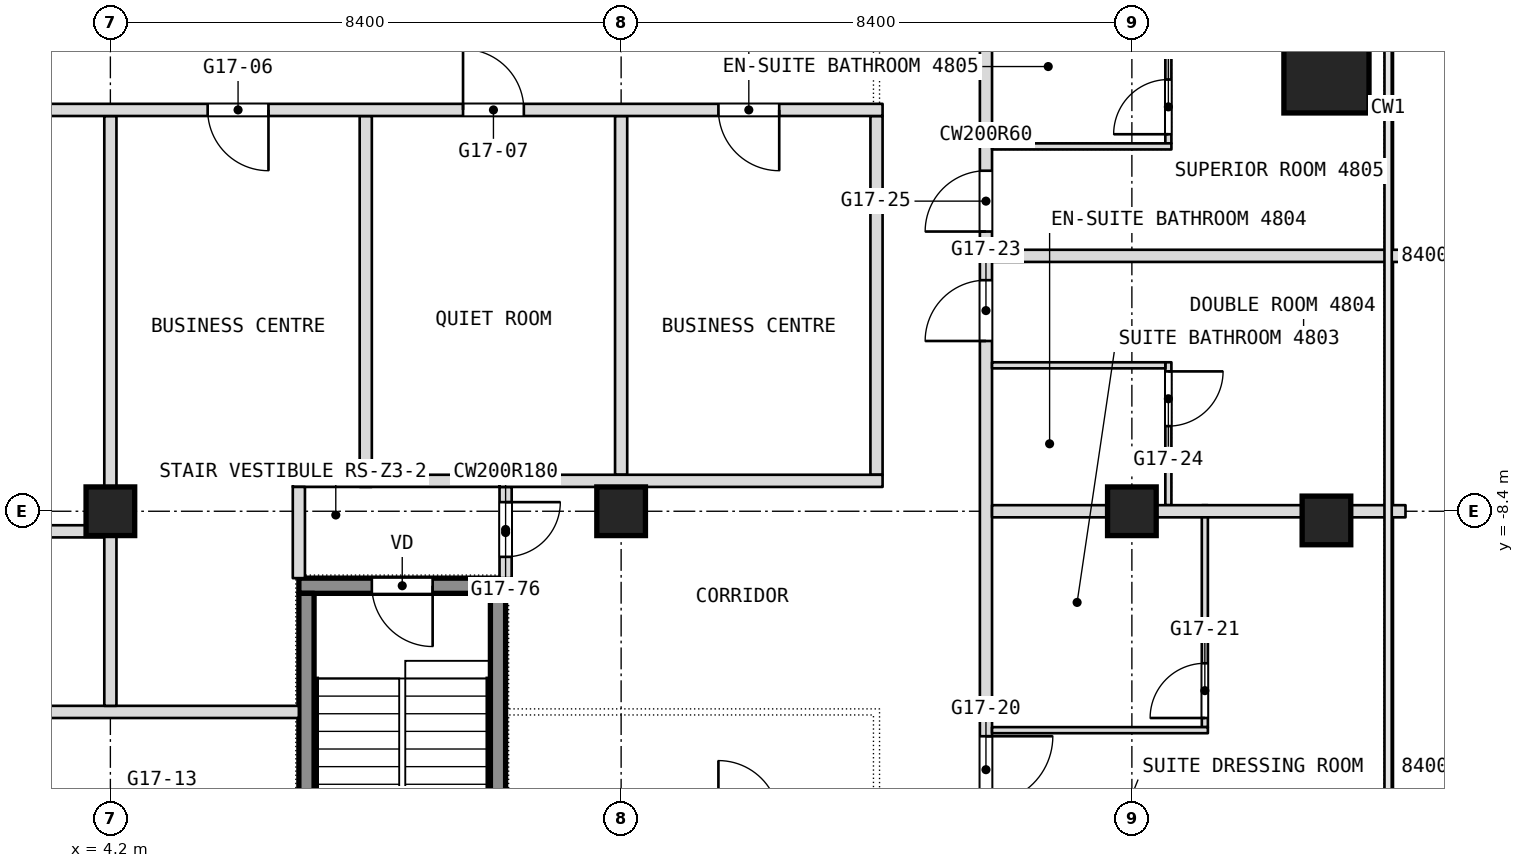
"""IFC4 building model, lengths in metres.
Left out: names, types, materials, properties, quantities, classifications, styles, units other than length and angle.
Written with IfcOpenShell. Run it as: python <this file> out.ifc"""

import sys

from ifc_helpers import new_model, si_unit, direction, frame, frame_2d, origin, origin_2d, place, context, subcontext, project, spatial, rectangle, extrude, element, fill, save


model = new_model("IFC4")
c1 = context("Model", 3, precision=1e-05, world=origin(), true_north=direction((0.0, 1.0)))
c2 = subcontext(c1, "Body", "Model", "MODEL_VIEW")
j1 = project(units=[si_unit("LENGTHUNIT", "METRE"), si_unit("PLANEANGLEUNIT", "RADIAN")], contexts=[c1])
p1 = place(None, origin())
s1 = spatial("IfcSite", under=j1, at=p1, CompositionType="ELEMENT")
p2 = place(p1, origin())
s2 = spatial("IfcBuilding", under=s1, at=p2, CompositionType="ELEMENT")
p3 = place(p2, frame((0.0, 0.0, 209.3)))
s3 = spatial("IfcBuildingStorey", under=s2, at=p3, CompositionType="ELEMENT", Elevation=209.3)
p4 = place(p3, frame((24.2, -1.15, 0.0), z_axis=(0.0, 0.0, 1.0), x_axis=(1.0, 0.0, 0.0)))
e1 = element("IfcColumn", 1, at=p4, inside=s3, PredefinedType="COLUMN", context=c2, shape_type="SweptSolid", body=[
    extrude(rectangle(XDim=1.4, YDim=1.4, at=origin_2d()), origin(), (0.0, 0.0, 1.0), 3.6),
])
for number, where, z_axis, x_axis in (
    (2, (4.2, -8.4, 0.0), (0.0, 0.0, 1.0), (1.0, 0.0, 0.0)),
    (3, (12.6, -8.4, 0.0), (0.0, 0.0, 1.0), (1.0, 0.0, 0.0)),
    (4, (21.0, -8.4, 0.0), (0.0, 0.0, 1.0), (1.0, 0.0, 0.0)),
    (5, (24.2, -8.551, 0.0), (0.0, 0.0, 1.0), (1.0, 0.0, 0.0)),
):
    element("IfcColumn", number, at=place(p3, frame(where, z_axis=z_axis, x_axis=x_axis)), inside=s3, PredefinedType="COLUMN", context=c2, shape_type="SweptSolid", body=[
        extrude(rectangle(XDim=0.8, YDim=0.8, at=origin_2d()), origin(), (0.0, 0.0, 1.0), 3.6),
    ])
p5 = place(p3, frame((22.2, -11.95, 0.0), z_axis=(0.0, 0.0, 1.0), x_axis=(0.0, 1.0, 0.0)))
e6 = element("IfcWall", 6, at=p5, inside=s3, PredefinedType="PARTITIONING", context=c2, shape_type="SweptSolid", body=[
    extrude(rectangle(XDim=3.65, YDim=0.1, at=frame_2d((1.825, 0.0))), origin(), (0.0, 0.0, 1.0), 3.34),
])
p6 = place(p5, frame((0.15, 0.0, 0.0)))
e7 = element("IfcOpeningElement", 7, at=p6, cuts=e6, PredefinedType="OPENING", context=c2, shape_type="SweptSolid", body=[
    extrude(rectangle(XDim=0.9, YDim=2.1, at=frame_2d((0.45, 1.05))), frame((0.0, 0.05, 0.0), z_axis=(0.0, -1.0, 0.0), x_axis=(1.0, 0.0, 0.0)), (0.0, 0.0, 1.0), 0.1),
])
p7 = place(p3, frame((21.6, -8.3, 0.0), z_axis=(0.0, 0.0, 1.0), x_axis=(0.0, 1.0, 0.0)))
e8 = element("IfcWall", 8, at=p7, inside=s3, PredefinedType="PARTITIONING", context=c2, shape_type="SweptSolid", body=[
    extrude(rectangle(XDim=2.35, YDim=0.1, at=frame_2d((1.175, 0.0))), origin(), (0.0, 0.0, 1.0), 3.34),
])
p8 = place(p7, frame((1.3, 0.0, 0.0)))
e9 = element("IfcOpeningElement", 9, at=p8, cuts=e8, PredefinedType="OPENING", context=c2, shape_type="SweptSolid", body=[
    extrude(rectangle(XDim=0.9, YDim=2.1, at=frame_2d((0.45, 1.05))), frame((0.0, 0.05, 0.0), z_axis=(0.0, -1.0, 0.0), x_axis=(1.0, 0.0, 0.0)), (0.0, 0.0, 1.0), 0.1),
])
p9 = place(p3, frame((21.6, -2.35, 0.0), z_axis=(0.0, 0.0, 1.0), x_axis=(0.0, 1.0, 0.0)))
e10 = element("IfcWall", 10, at=p9, inside=s3, PredefinedType="PARTITIONING", context=c2, shape_type="SweptSolid", body=[
    extrude(rectangle(XDim=2.45, YDim=0.1, at=frame_2d((1.225, 0.0))), origin(), (0.0, 0.0, 1.0), 3.34),
])
p10 = place(p9, frame((0.15, 0.0, 0.0)))
e11 = element("IfcOpeningElement", 11, at=p10, cuts=e10, PredefinedType="OPENING", context=c2, shape_type="SweptSolid", body=[
    extrude(rectangle(XDim=0.9, YDim=2.1, at=frame_2d((0.45, 1.05))), frame((0.0, 0.05, 0.0), z_axis=(0.0, -1.0, 0.0), x_axis=(1.0, 0.0, 0.0)), (0.0, 0.0, 1.0), 0.1),
])
p11 = place(p3, frame((18.6, -26.751, 0.0), z_axis=(0.0, 0.0, 1.0), x_axis=(0.0, 1.0, 0.0)))
e12 = element("IfcWall", 12, at=p11, inside=s3, PredefinedType="PARTITIONING", context=c2, shape_type="SweptSolid", body=[
    extrude(rectangle(XDim=49.091, YDim=0.2, at=frame_2d((24.545, 0.0))), origin(), (0.0, 0.0, 1.0), 3.34),
])
p12 = place(p11, frame((3.413, 0.0, 0.0)))
e13 = element("IfcOpeningElement", 13, at=p12, cuts=e12, PredefinedType="OPENING", context=c2, shape_type="SweptSolid", body=[
    extrude(rectangle(XDim=1.0, YDim=2.1, at=frame_2d((0.5, 1.05))), frame((0.0, 0.1, 0.0), z_axis=(0.0, -1.0, 0.0), x_axis=(1.0, 0.0, 0.0)), (0.0, 0.0, 1.0), 0.2),
])
p13 = place(p11, frame((5.838, 0.0, 0.0)))
e14 = element("IfcOpeningElement", 14, at=p13, cuts=e12, PredefinedType="OPENING", context=c2, shape_type="SweptSolid", body=[
    extrude(rectangle(XDim=1.0, YDim=2.1, at=frame_2d((0.5, 1.05))), frame((0.0, 0.1, 0.0), z_axis=(0.0, -1.0, 0.0), x_axis=(1.0, 0.0, 0.0)), (0.0, 0.0, 1.0), 0.2),
])
p14 = place(p11, frame((13.551, 0.0, 0.0)))
e15 = element("IfcOpeningElement", 15, at=p14, cuts=e12, PredefinedType="OPENING", context=c2, shape_type="SweptSolid", body=[
    extrude(rectangle(XDim=1.1, YDim=2.1, at=frame_2d((0.55, 1.05))), frame((0.0, 0.1, 0.0), z_axis=(0.0, -1.0, 0.0), x_axis=(1.0, 0.0, 0.0)), (0.0, 0.0, 1.0), 0.2),
])
p15 = place(p11, frame((21.151, 0.0, 0.0)))
e16 = element("IfcOpeningElement", 16, at=p15, cuts=e12, PredefinedType="OPENING", context=c2, shape_type="SweptSolid", body=[
    extrude(rectangle(XDim=1.0, YDim=2.1, at=frame_2d((0.5, 1.05))), frame((0.0, 0.1, 0.0), z_axis=(0.0, -1.0, 0.0), x_axis=(1.0, 0.0, 0.0)), (0.0, 0.0, 1.0), 0.2),
])
p16 = place(p11, frame((22.951, 0.0, 0.0)))
e17 = element("IfcOpeningElement", 17, at=p16, cuts=e12, PredefinedType="OPENING", context=c2, shape_type="SweptSolid", body=[
    extrude(rectangle(XDim=1.0, YDim=2.1, at=frame_2d((0.5, 1.05))), frame((0.0, 0.1, 0.0), z_axis=(0.0, -1.0, 0.0), x_axis=(1.0, 0.0, 0.0)), (0.0, 0.0, 1.0), 0.2),
])
p17 = place(p11, frame((30.351, 0.0, 0.0)))
e18 = element("IfcOpeningElement", 18, at=p17, cuts=e12, PredefinedType="OPENING", context=c2, shape_type="SweptSolid", body=[
    extrude(rectangle(XDim=1.1, YDim=2.1, at=frame_2d((0.55, 1.05))), frame((0.0, 0.1, 0.0), z_axis=(0.0, -1.0, 0.0), x_axis=(1.0, 0.0, 0.0)), (0.0, 0.0, 1.0), 0.2),
])
p18 = place(p11, frame((37.951, 0.0, 0.0)))
e19 = element("IfcOpeningElement", 19, at=p18, cuts=e12, PredefinedType="OPENING", context=c2, shape_type="SweptSolid", body=[
    extrude(rectangle(XDim=1.0, YDim=2.1, at=frame_2d((0.5, 1.05))), frame((0.0, 0.1, 0.0), z_axis=(0.0, -1.0, 0.0), x_axis=(1.0, 0.0, 0.0)), (0.0, 0.0, 1.0), 0.2),
])
p19 = place(p11, frame((39.751, 0.0, 0.0)))
e20 = element("IfcOpeningElement", 20, at=p19, cuts=e12, PredefinedType="OPENING", context=c2, shape_type="SweptSolid", body=[
    extrude(rectangle(XDim=1.0, YDim=2.1, at=frame_2d((0.5, 1.05))), frame((0.0, 0.1, 0.0), z_axis=(0.0, -1.0, 0.0), x_axis=(1.0, 0.0, 0.0)), (0.0, 0.0, 1.0), 0.2),
])
p20 = place(p11, frame((44.051, 0.0, 0.0)))
e21 = element("IfcOpeningElement", 21, at=p20, cuts=e12, PredefinedType="OPENING", context=c2, shape_type="SweptSolid", body=[
    extrude(rectangle(XDim=1.0, YDim=2.1, at=frame_2d((0.5, 1.05))), frame((0.0, 0.1, 0.0), z_axis=(0.0, -1.0, 0.0), x_axis=(1.0, 0.0, 0.0)), (0.0, 0.0, 1.0), 0.2),
])
for number, where, z_axis, x_axis in (
    (22, (16.8, -7.8, 0.0), (0.0, 0.0, 1.0), (0.0, 1.0, 0.0)),
    (23, (12.6, -7.8, 0.0), (0.0, 0.0, 1.0), (0.0, 1.0, 0.0)),
):
    element("IfcWall", number, at=place(p3, frame(where, z_axis=z_axis, x_axis=x_axis)), inside=s3, PredefinedType="PARTITIONING", context=c2, shape_type="SweptSolid", body=[
        extrude(rectangle(XDim=5.9, YDim=0.2, at=frame_2d((2.95, 0.0))), origin(), (0.0, 0.0, 1.0), 3.34),
    ])
p21 = place(p3, frame((18.7, -12.0, 0.0), z_axis=(0.0, 0.0, 1.0), x_axis=(1.0, 0.0, 0.0)))
e24 = element("IfcWall", 24, at=p21, inside=s3, PredefinedType="PARTITIONING", context=c2, shape_type="SweptSolid", body=[
    extrude(rectangle(XDim=3.55, YDim=0.1, at=frame_2d((1.775, 0.0))), origin(), (0.0, 0.0, 1.0), 3.34),
])
p22 = place(p3, frame((-7.3, -11.7, 0.0), z_axis=(0.0, 0.0, 1.0), x_axis=(1.0, 0.0, 0.0)))
e25 = element("IfcWall", 25, at=p22, inside=s3, PredefinedType="PARTITIONING", context=c2, shape_type="SweptSolid", body=[
    extrude(rectangle(XDim=14.6, YDim=0.2, at=frame_2d((7.3, 0.0))), origin(), (0.0, 0.0, 1.0), 3.34),
])
p23 = place(p22, frame((4.7, 0.0, 0.0)))
e26 = element("IfcOpeningElement", 26, at=p23, cuts=e25, PredefinedType="OPENING", context=c2, shape_type="SweptSolid", body=[
    extrude(rectangle(XDim=1.0, YDim=2.1, at=frame_2d((0.5, 1.05))), frame((0.0, 0.1, 0.0), z_axis=(0.0, -1.0, 0.0), x_axis=(1.0, 0.0, 0.0)), (0.0, 0.0, 1.0), 0.2),
])
p24 = place(p22, frame((8.9, 0.0, 0.0)))
e27 = element("IfcOpeningElement", 27, at=p24, cuts=e25, PredefinedType="OPENING", context=c2, shape_type="SweptSolid", body=[
    extrude(rectangle(XDim=1.0, YDim=2.1, at=frame_2d((0.5, 1.05))), frame((0.0, 0.1, 0.0), z_axis=(0.0, -1.0, 0.0), x_axis=(1.0, 0.0, 0.0)), (0.0, 0.0, 1.0), 0.2),
])
p25 = place(p3, frame((10.7, -9.5, 0.0), z_axis=(0.0, 0.0, 1.0), x_axis=(0.0, 1.0, 0.0)))
e28 = element("IfcWall", 28, at=p25, inside=s3, PredefinedType="PARTITIONING", context=c2, shape_type="SweptSolid", body=[
    extrude(rectangle(XDim=1.5, YDim=0.2, at=frame_2d((0.75, 0.0))), origin(), (0.0, 0.0, 1.0), 3.34),
])
p26 = place(p25, frame((0.35, 0.0, 0.0)))
e29 = element("IfcOpeningElement", 29, at=p26, cuts=e28, PredefinedType="OPENING", context=c2, shape_type="SweptSolid", body=[
    extrude(rectangle(XDim=0.9, YDim=2.1, at=frame_2d((0.45, 1.05))), frame((0.0, 0.1, 0.0), z_axis=(0.0, -1.0, 0.0), x_axis=(1.0, 0.0, 0.0)), (0.0, 0.0, 1.0), 0.2),
])
p27 = place(p3, frame((-4.1, -8.73, 0.0), z_axis=(0.0, 0.0, 1.0), x_axis=(1.0, 0.0, 0.0)))
e30 = element("IfcWall", 30, at=p27, inside=s3, PredefinedType="PARTITIONING", context=c2, shape_type="SweptSolid", body=[
    extrude(rectangle(XDim=8.2, YDim=0.2, at=frame_2d((4.1, 0.0))), origin(), (0.0, 0.0, 1.0), 3.34),
])
p28 = place(p3, frame((8.4, -8.0, 0.0), z_axis=(0.0, 0.0, 1.0), x_axis=(0.0, 1.0, 0.0)))
e31 = element("IfcWall", 31, at=p28, inside=s3, PredefinedType="PARTITIONING", context=c2, shape_type="SweptSolid", body=[
    extrude(rectangle(XDim=6.1, YDim=0.2, at=frame_2d((3.05, 0.0))), origin(), (0.0, 0.0, 1.0), 3.34),
])
p29 = place(p3, frame((18.7, -8.4, 0.0), z_axis=(0.0, 0.0, 1.0), x_axis=(1.0, 0.0, 0.0)))
e32 = element("IfcWall", 32, at=p29, inside=s3, PredefinedType="PARTITIONING", context=c2, shape_type="SweptSolid", body=[
    extrude(rectangle(XDim=6.8, YDim=0.2, at=frame_2d((3.4, 0.0))), origin(), (0.0, 0.0, 1.0), 2.94),
])
p30 = place(p3, frame((10.6, -7.9, 0.0), z_axis=(0.0, 0.0, 1.0), x_axis=(1.0, 0.0, 0.0)))
e33 = element("IfcWall", 33, at=p30, inside=s3, PredefinedType="PARTITIONING", context=c2, shape_type="SweptSolid", body=[
    extrude(rectangle(XDim=6.3, YDim=0.2, at=frame_2d((3.15, 0.0))), origin(), (0.0, 0.0, 1.0), 3.34),
])
p31 = place(p3, frame((7.2, -7.9, 0.0), z_axis=(0.0, 0.0, 1.0), x_axis=(1.0, 0.0, 0.0)))
e34 = element("IfcWall", 34, at=p31, inside=s3, PredefinedType="PARTITIONING", context=c2, shape_type="SweptSolid", body=[
    extrude(rectangle(XDim=3.4, YDim=0.2, at=frame_2d((1.7, 0.0))), origin(), (0.0, 0.0, 1.0), 3.34),
])
p32 = place(p3, frame((7.3, -9.5, 0.0), z_axis=(0.0, 0.0, 1.0), x_axis=(0.0, 1.0, 0.0)))
e35 = element("IfcWall", 35, at=p32, inside=s3, PredefinedType="PARTITIONING", context=c2, shape_type="SweptSolid", body=[
    extrude(rectangle(XDim=1.5, YDim=0.2, at=frame_2d((0.75, 0.0))), origin(), (0.0, 0.0, 1.0), 3.34),
])
p33 = place(p3, frame((18.7, -6.0, 0.0), z_axis=(0.0, 0.0, 1.0), x_axis=(1.0, 0.0, 0.0)))
e36 = element("IfcWall", 36, at=p33, inside=s3, PredefinedType="PARTITIONING", context=c2, shape_type="SweptSolid", body=[
    extrude(rectangle(XDim=2.85, YDim=0.1, at=frame_2d((1.425, 0.0))), origin(), (0.0, 0.0, 1.0), 3.34),
])
p34 = place(p3, frame((4.2, -11.6, 0.0), z_axis=(0.0, 0.0, 1.0), x_axis=(0.0, 1.0, 0.0)))
e37 = element("IfcWall", 37, at=p34, inside=s3, PredefinedType="PARTITIONING", context=c2, shape_type="SweptSolid", body=[
    extrude(rectangle(XDim=9.7, YDim=0.2, at=frame_2d((4.85, 0.0))), origin(), (0.0, 0.0, 1.0), 3.34),
])
p35 = place(p3, frame((18.7, -4.2, 0.0), z_axis=(0.0, 0.0, 1.0), x_axis=(1.0, 0.0, 0.0)))
e38 = element("IfcWall", 38, at=p35, inside=s3, PredefinedType="PARTITIONING", context=c2, shape_type="SweptSolid", body=[
    extrude(rectangle(XDim=6.8, YDim=0.2, at=frame_2d((3.4, 0.0))), origin(), (0.0, 0.0, 1.0), 3.34),
])
p36 = place(p3, frame((18.7, -2.4, 0.0), z_axis=(0.0, 0.0, 1.0), x_axis=(1.0, 0.0, 0.0)))
e39 = element("IfcWall", 39, at=p36, inside=s3, PredefinedType="PARTITIONING", context=c2, shape_type="SweptSolid", body=[
    extrude(rectangle(XDim=2.95, YDim=0.1, at=frame_2d((1.475, 0.0))), origin(), (0.0, 0.0, 1.0), 3.34),
])
p37 = place(p3, frame((-16.9, -1.8, 0.0), z_axis=(0.0, 0.0, 1.0), x_axis=(1.0, 0.0, 0.0)))
e40 = element("IfcWall", 40, at=p37, inside=s3, PredefinedType="PARTITIONING", context=c2, shape_type="SweptSolid", body=[
    extrude(rectangle(XDim=33.8, YDim=0.2, at=frame_2d((16.9, 0.0))), origin(), (0.0, 0.0, 1.0), 3.34),
])
p38 = place(p37, frame((1.7, 0.0, 0.0)))
e41 = element("IfcOpeningElement", 41, at=p38, cuts=e40, PredefinedType="OPENING", context=c2, shape_type="SweptSolid", body=[
    extrude(rectangle(XDim=1.0, YDim=2.1, at=frame_2d((0.5, 1.05))), frame((0.0, 0.1, 0.0), z_axis=(0.0, -1.0, 0.0), x_axis=(1.0, 0.0, 0.0)), (0.0, 0.0, 1.0), 0.2),
])
p39 = place(p37, frame((5.9, 0.0, 0.0)))
e42 = element("IfcOpeningElement", 42, at=p39, cuts=e40, PredefinedType="OPENING", context=c2, shape_type="SweptSolid", body=[
    extrude(rectangle(XDim=1.0, YDim=2.1, at=frame_2d((0.5, 1.05))), frame((0.0, 0.1, 0.0), z_axis=(0.0, -1.0, 0.0), x_axis=(1.0, 0.0, 0.0)), (0.0, 0.0, 1.0), 0.2),
])
p40 = place(p37, frame((10.1, 0.0, 0.0)))
e43 = element("IfcOpeningElement", 43, at=p40, cuts=e40, PredefinedType="OPENING", context=c2, shape_type="SweptSolid", body=[
    extrude(rectangle(XDim=1.0, YDim=2.1, at=frame_2d((0.5, 1.05))), frame((0.0, 0.1, 0.0), z_axis=(0.0, -1.0, 0.0), x_axis=(1.0, 0.0, 0.0)), (0.0, 0.0, 1.0), 0.2),
])
p41 = place(p37, frame((22.7, 0.0, 0.0)))
e44 = element("IfcOpeningElement", 44, at=p41, cuts=e40, PredefinedType="OPENING", context=c2, shape_type="SweptSolid", body=[
    extrude(rectangle(XDim=1.0, YDim=2.1, at=frame_2d((0.5, 1.05))), frame((0.0, 0.1, 0.0), z_axis=(0.0, -1.0, 0.0), x_axis=(1.0, 0.0, 0.0)), (0.0, 0.0, 1.0), 0.2),
])
p42 = place(p37, frame((26.9, 0.0, 0.0)))
e45 = element("IfcOpeningElement", 45, at=p42, cuts=e40, PredefinedType="OPENING", context=c2, shape_type="SweptSolid", body=[
    extrude(rectangle(XDim=1.0, YDim=2.1, at=frame_2d((0.5, 1.05))), frame((0.0, 0.1, 0.0), z_axis=(0.0, -1.0, 0.0), x_axis=(1.0, 0.0, 0.0)), (0.0, 0.0, 1.0), 0.2),
])
p43 = place(p37, frame((31.1, 0.0, 0.0)))
e46 = element("IfcOpeningElement", 46, at=p43, cuts=e40, PredefinedType="OPENING", context=c2, shape_type="SweptSolid", body=[
    extrude(rectangle(XDim=1.0, YDim=2.1, at=frame_2d((0.5, 1.05))), frame((0.0, 0.1, 0.0), z_axis=(0.0, -1.0, 0.0), x_axis=(1.0, 0.0, 0.0)), (0.0, 0.0, 1.0), 0.2),
])
p44 = place(p37, frame((14.3, 0.0, 0.0)))
e47 = element("IfcOpeningElement", 47, at=p44, cuts=e40, PredefinedType="OPENING", context=c2, shape_type="SweptSolid", body=[
    extrude(rectangle(XDim=1.0, YDim=2.1, at=frame_2d((0.5, 1.05))), frame((0.0, 0.1, 0.0), z_axis=(0.0, -1.0, 0.0), x_axis=(1.0, 0.0, 0.0)), (0.0, 0.0, 1.0), 0.2),
])
p45 = place(p37, frame((18.5, 0.0, 0.0)))
e48 = element("IfcOpeningElement", 48, at=p45, cuts=e40, PredefinedType="OPENING", context=c2, shape_type="SweptSolid", body=[
    extrude(rectangle(XDim=1.0, YDim=2.1, at=frame_2d((0.5, 1.05))), frame((0.0, 0.1, 0.0), z_axis=(0.0, -1.0, 0.0), x_axis=(1.0, 0.0, 0.0)), (0.0, 0.0, 1.0), 0.2),
])
p46 = place(p3, frame((7.3, -9.625, 0.1), z_axis=(0.0, 0.0, 1.0), x_axis=(1.0, 0.0, 0.0)))
e49 = element("IfcWall", 49, at=p46, inside=s3, PredefinedType="SHEAR", context=c2, shape_type="SweptSolid", body=[
    extrude(rectangle(XDim=3.4, YDim=0.25, at=frame_2d((1.7, 0.0))), origin(), (0.0, 0.0, 1.0), 3.6),
])
p47 = place(p46, frame((1.2, 0.0, 0.0)))
e50 = element("IfcOpeningElement", 50, at=p47, cuts=e49, PredefinedType="OPENING", context=c2, shape_type="SweptSolid", body=[
    extrude(rectangle(XDim=1.0, YDim=2.1, at=frame_2d((0.5, 1.05))), frame((0.0, 0.125, 0.0), z_axis=(0.0, -1.0, 0.0), x_axis=(1.0, 0.0, 0.0)), (0.0, 0.0, 1.0), 0.25),
])
for number, where, z_axis, x_axis in (
    (51, (7.425, -15.45, 0.1), (0.0, 0.0, 1.0), (0.0, 1.0, 0.0)),
    (52, (10.575, -15.45, 0.1), (0.0, 0.0, 1.0), (0.0, 1.0, 0.0)),
):
    element("IfcWall", number, at=place(p3, frame(where, z_axis=z_axis, x_axis=x_axis)), inside=s3, PredefinedType="SHEAR", context=c2, shape_type="SweptSolid", body=[
        extrude(rectangle(XDim=5.7, YDim=0.25, at=frame_2d((2.85, 0.0))), origin(), (0.0, 0.0, 1.0), 3.6),
    ])
p48 = place(p6, origin())
e53 = element("IfcDoor", 53, at=p48, inside=s3, OperationType="SINGLE_SWING_LEFT", PredefinedType="DOOR", context=c2, shape_type="SweptSolid", body=[
    extrude(rectangle(XDim=0.9, YDim=2.1, at=frame_2d((0.45, 1.05))), frame((0.0, 0.025, 0.0), z_axis=(0.0, -1.0, 0.0), x_axis=(1.0, 0.0, 0.0)), (0.0, 0.0, 1.0), 0.05),
])
fill(e7, e53)
p49 = place(p8, origin())
e54 = element("IfcDoor", 54, at=p49, inside=s3, OperationType="SINGLE_SWING_RIGHT", PredefinedType="DOOR", context=c2, shape_type="SweptSolid", body=[
    extrude(rectangle(XDim=0.9, YDim=2.1, at=frame_2d((0.45, 1.05))), frame((0.0, 0.025, 0.0), z_axis=(0.0, -1.0, 0.0), x_axis=(1.0, 0.0, 0.0)), (0.0, 0.0, 1.0), 0.05),
])
fill(e9, e54)
p50 = place(p10, origin())
e55 = element("IfcDoor", 55, at=p50, inside=s3, OperationType="SINGLE_SWING_LEFT", PredefinedType="DOOR", context=c2, shape_type="SweptSolid", body=[
    extrude(rectangle(XDim=0.9, YDim=2.1, at=frame_2d((0.45, 1.05))), frame((0.0, 0.025, 0.0), z_axis=(0.0, -1.0, 0.0), x_axis=(1.0, 0.0, 0.0)), (0.0, 0.0, 1.0), 0.05),
])
fill(e11, e55)
p51 = place(p14, origin())
e56 = element("IfcDoor", 56, at=p51, inside=s3, OperationType="SINGLE_SWING_LEFT", PredefinedType="DOOR", context=c2, shape_type="SweptSolid", body=[
    extrude(rectangle(XDim=1.1, YDim=2.1, at=frame_2d((0.55, 1.05))), frame((0.0, 0.025, 0.0), z_axis=(0.0, -1.0, 0.0), x_axis=(1.0, 0.0, 0.0)), (0.0, 0.0, 1.0), 0.05),
])
fill(e15, e56)
p52 = place(p15, origin())
e57 = element("IfcDoor", 57, at=p52, inside=s3, OperationType="SINGLE_SWING_LEFT", PredefinedType="DOOR", context=c2, shape_type="SweptSolid", body=[
    extrude(rectangle(XDim=1.0, YDim=2.1, at=frame_2d((0.5, 1.05))), frame((0.0, 0.025, 0.0), z_axis=(0.0, -1.0, 0.0), x_axis=(1.0, 0.0, 0.0)), (0.0, 0.0, 1.0), 0.05),
])
fill(e16, e57)
p53 = place(p16, origin())
e58 = element("IfcDoor", 58, at=p53, inside=s3, OperationType="SINGLE_SWING_LEFT", PredefinedType="DOOR", context=c2, shape_type="SweptSolid", body=[
    extrude(rectangle(XDim=1.0, YDim=2.1, at=frame_2d((0.5, 1.05))), frame((0.0, 0.025, 0.0), z_axis=(0.0, -1.0, 0.0), x_axis=(1.0, 0.0, 0.0)), (0.0, 0.0, 1.0), 0.05),
])
fill(e17, e58)
p54 = place(p26, origin())
e59 = element("IfcDoor", 59, at=p54, inside=s3, OperationType="SINGLE_SWING_RIGHT", PredefinedType="DOOR", context=c2, shape_type="SweptSolid", body=[
    extrude(rectangle(XDim=0.9, YDim=2.1, at=frame_2d((0.45, 1.05))), frame((0.0, 0.025, 0.0), z_axis=(0.0, -1.0, 0.0), x_axis=(1.0, 0.0, 0.0)), (0.0, 0.0, 1.0), 0.05),
])
fill(e29, e59)
p55 = place(p41, origin())
e60 = element("IfcDoor", 60, at=p55, inside=s3, OperationType="SINGLE_SWING_LEFT", PredefinedType="DOOR", context=c2, shape_type="SweptSolid", body=[
    extrude(rectangle(XDim=1.0, YDim=2.1, at=frame_2d((0.5, 1.05))), frame((0.0, 0.025, 0.0), z_axis=(0.0, -1.0, 0.0), x_axis=(1.0, 0.0, 0.0)), (0.0, 0.0, 1.0), 0.05),
])
fill(e44, e60)
p56 = place(p42, origin())
e61 = element("IfcDoor", 61, at=p56, inside=s3, OperationType="SINGLE_SWING_RIGHT", PredefinedType="DOOR", context=c2, shape_type="SweptSolid", body=[
    extrude(rectangle(XDim=1.0, YDim=2.1, at=frame_2d((0.5, 1.05))), frame((0.0, 0.025, 0.0), z_axis=(0.0, -1.0, 0.0), x_axis=(1.0, 0.0, 0.0)), (0.0, 0.0, 1.0), 0.05),
])
fill(e45, e61)
p57 = place(p43, origin())
e62 = element("IfcDoor", 62, at=p57, inside=s3, OperationType="SINGLE_SWING_LEFT", PredefinedType="DOOR", context=c2, shape_type="SweptSolid", body=[
    extrude(rectangle(XDim=1.0, YDim=2.1, at=frame_2d((0.5, 1.05))), frame((0.0, 0.025, 0.0), z_axis=(0.0, -1.0, 0.0), x_axis=(1.0, 0.0, 0.0)), (0.0, 0.0, 1.0), 0.05),
])
fill(e46, e62)
p58 = place(p47, origin())
e63 = element("IfcDoor", 63, at=p58, inside=s3, OperationType="SINGLE_SWING_LEFT", PredefinedType="DOOR", context=c2, shape_type="SweptSolid", body=[
    extrude(rectangle(XDim=1.0, YDim=2.1, at=frame_2d((0.5, 1.05))), frame((0.0, 0.025, 0.0), z_axis=(0.0, -1.0, 0.0), x_axis=(1.0, 0.0, 0.0)), (0.0, 0.0, 1.0), 0.05),
])
fill(e50, e63)
save(model, sys.argv[1])
